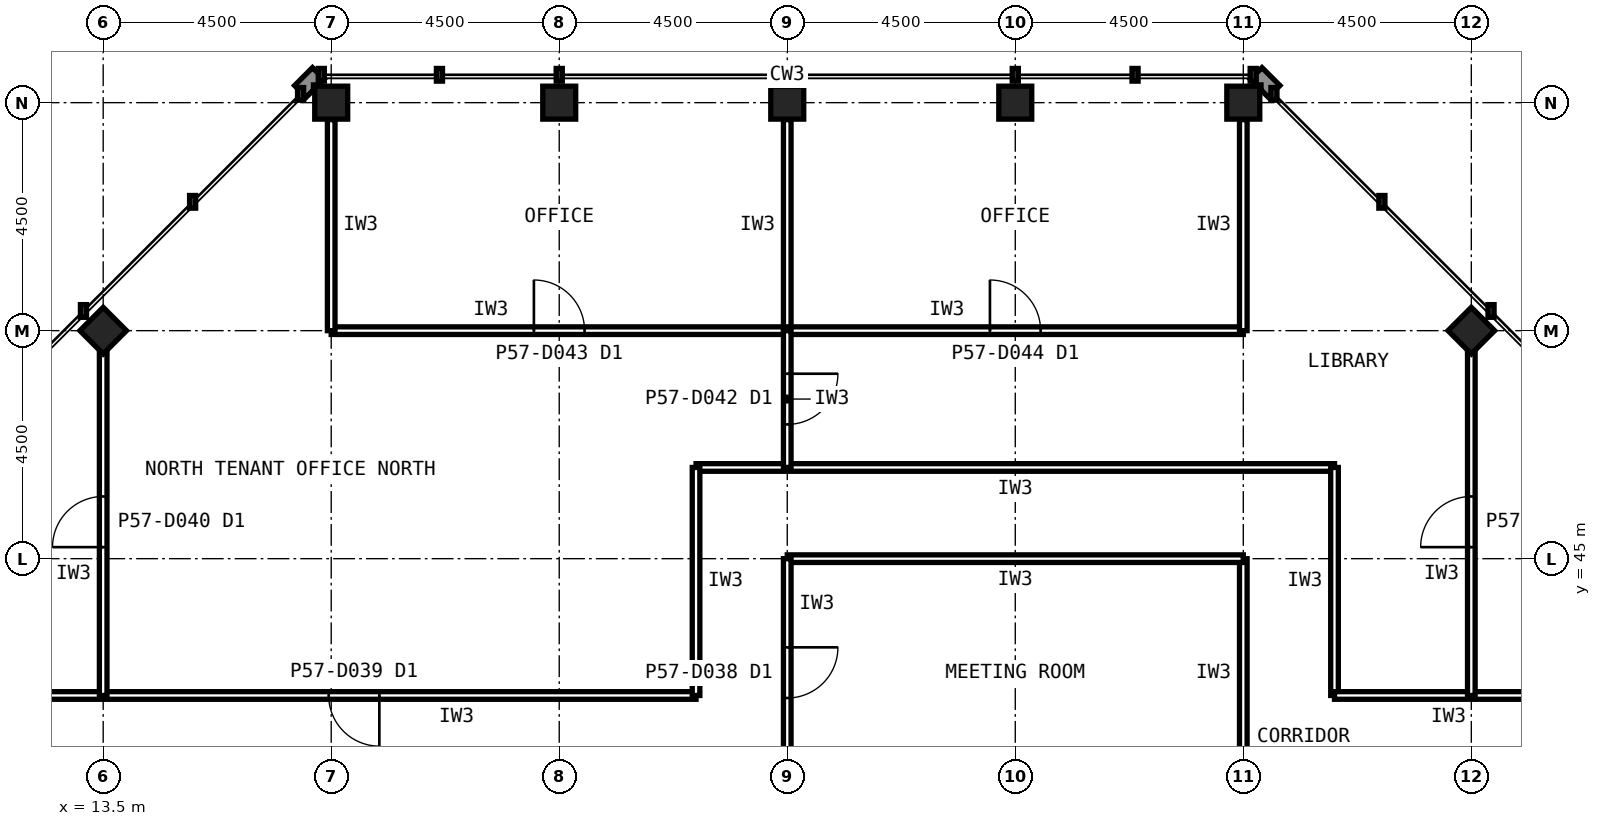
"""IFC4 building model, lengths in metres.
Left out: names, types, materials, properties, quantities, classifications, styles, units other than length and angle.
Written with IfcOpenShell. Run it as: python <this file> out.ifc"""

import sys

from ifc_helpers import new_model, si_unit, direction, frame, frame_2d, origin, origin_2d, place, context, subcontext, project, spatial, rectangle, hollow_rectangle, extrude, element, fill, save


model = new_model("IFC4")
c1 = context("Model", 3, precision=1e-05, world=origin(), true_north=direction((0.0, 1.0)))
c2 = subcontext(c1, "Body", "Model", "MODEL_VIEW")
j1 = project(units=[si_unit("LENGTHUNIT", "METRE"), si_unit("PLANEANGLEUNIT", "RADIAN")], contexts=[c1])
p1 = place(None, origin())
s1 = spatial("IfcSite", under=j1, at=p1, CompositionType="ELEMENT")
p2 = place(p1, origin())
s2 = spatial("IfcBuilding", under=s1, at=p2, CompositionType="ELEMENT")
p3 = place(p2, frame((0.0, 0.0, 238.6)))
s3 = spatial("IfcBuildingStorey", under=s2, at=p3, CompositionType="ELEMENT", Elevation=238.6)
for number, where, z_axis, x_axis in (
    (1, (36.0, 54.0, 0.0), (0.0, 0.0, 1.0), (1.0, 0.0, 0.0)),
    (2, (31.5, 54.0, 0.0), (0.0, 0.0, 1.0), (1.0, 0.0, 0.0)),
    (3, (27.0, 54.0, 0.0), (0.0, 0.0, 1.0), (1.0, 0.0, 0.0)),
    (4, (22.5, 54.0, 0.0), (0.0, 0.0, 1.0), (1.0, 0.0, 0.0)),
    (5, (18.0, 54.0, 0.0), (0.0, 0.0, 1.0), (1.0, 0.0, 0.0)),
    (6, (40.5, 49.5, 0.0), (0.0, 0.0, 1.0), (0.707, 0.707, 0.0)),
    (7, (13.5, 49.5, 0.0), (0.0, 0.0, 1.0), (0.707, 0.707, 0.0)),
):
    element("IfcColumn", number, at=place(p3, frame(where, z_axis=z_axis, x_axis=x_axis)), inside=s3, PredefinedType="COLUMN", context=c2, shape_type="SweptSolid", body=[
        extrude(hollow_rectangle(XDim=0.65, YDim=0.65, WallThickness=0.032, at=origin_2d()), origin(), (0.0, 0.0, 1.0), 4.0),
    ])
p4 = place(p3, frame((25.2, 42.3, 0.0), z_axis=(0.0, 0.0, 1.0), x_axis=(-1.0, 0.0, 0.0)))
e8 = element("IfcWall", 8, at=p4, inside=s3, PredefinedType="PARTITIONING", context=c2, shape_type="SweptSolid", body=[
    extrude(rectangle(XDim=13.5, YDim=0.15, at=frame_2d((6.75, 0.0))), origin(), (0.0, 0.0, 1.0), 3.84),
])
p5 = place(p4, frame((6.25, 0.0, 0.0)))
e9 = element("IfcOpeningElement", 9, at=p5, cuts=e8, PredefinedType="OPENING", context=c2, shape_type="SweptSolid", body=[
    extrude(rectangle(XDim=1.0, YDim=2.1, at=frame_2d((0.5, 1.05))), frame((0.0, 0.085, 0.0), z_axis=(0.0, -1.0, 0.0), x_axis=(1.0, 0.0, 0.0)), (0.0, 0.0, 1.0), 0.17),
])
p6 = place(p3, frame((37.8, 46.8, 0.0), z_axis=(0.0, 0.0, 1.0), x_axis=(-1.0, 0.0, 0.0)))
e10 = element("IfcWall", 10, at=p6, inside=s3, PredefinedType="PARTITIONING", context=c2, shape_type="SweptSolid", body=[
    extrude(rectangle(XDim=12.6, YDim=0.15, at=frame_2d((6.3, 0.0))), origin(), (0.0, 0.0, 1.0), 3.84),
])
for number, where, z_axis, x_axis in (
    (11, (25.2, 46.8, 0.0), (0.0, 0.0, 1.0), (0.0, -1.0, 0.0)),
    (12, (37.8, 42.3, 0.0), (0.0, 0.0, 1.0), (0.0, 1.0, 0.0)),
    (13, (42.3, 42.3, 0.0), (0.0, 0.0, 1.0), (-1.0, 0.0, 0.0)),
):
    element("IfcWall", number, at=place(p3, frame(where, z_axis=z_axis, x_axis=x_axis)), inside=s3, PredefinedType="PARTITIONING", context=c2, shape_type="SweptSolid", body=[
        extrude(rectangle(XDim=4.5, YDim=0.15, at=frame_2d((2.25, 0.0))), origin(), (0.0, 0.0, 1.0), 3.84),
    ])
p7 = place(p3, frame((36.0, 40.5, 0.0), z_axis=(0.0, 0.0, 1.0), x_axis=(0.0, 1.0, 0.0)))
e14 = element("IfcWall", 14, at=p7, inside=s3, PredefinedType="PARTITIONING", context=c2, shape_type="SweptSolid", body=[
    extrude(rectangle(XDim=4.5, YDim=0.15, at=frame_2d((2.25, 0.0))), origin(), (0.0, 0.0, 1.0), 2.989),
])
p8 = place(p3, frame((36.0, 45.0, 0.0), z_axis=(0.0, 0.0, 1.0), x_axis=(-1.0, 0.0, 0.0)))
e15 = element("IfcWall", 15, at=p8, inside=s3, PredefinedType="PARTITIONING", context=c2, shape_type="SweptSolid", body=[
    extrude(rectangle(XDim=9.0, YDim=0.15, at=frame_2d((4.5, 0.0))), origin(), (0.0, 0.0, 1.0), 3.84),
])
p9 = place(p3, frame((27.0, 45.0, 0.0), z_axis=(0.0, 0.0, 1.0), x_axis=(0.0, -1.0, 0.0)))
e16 = element("IfcWall", 16, at=p9, inside=s3, PredefinedType="PARTITIONING", context=c2, shape_type="SweptSolid", body=[
    extrude(rectangle(XDim=4.5, YDim=0.15, at=frame_2d((2.25, 0.0))), origin(), (0.0, 0.0, 1.0), 2.989),
])
p10 = place(p9, frame((1.75, 0.0, 0.0)))
e17 = element("IfcOpeningElement", 17, at=p10, cuts=e16, PredefinedType="OPENING", context=c2, shape_type="SweptSolid", body=[
    extrude(rectangle(XDim=1.0, YDim=2.1, at=frame_2d((0.5, 1.05))), frame((0.0, 0.085, 0.0), z_axis=(0.0, -1.0, 0.0), x_axis=(1.0, 0.0, 0.0)), (0.0, 0.0, 1.0), 0.17),
])
p11 = place(p3, frame((18.0, 49.5, 0.0), z_axis=(0.0, 0.0, 1.0), x_axis=(1.0, 0.0, 0.0)))
e18 = element("IfcWall", 18, at=p11, inside=s3, PredefinedType="PARTITIONING", context=c2, shape_type="SweptSolid", body=[
    extrude(rectangle(XDim=9.0, YDim=0.15, at=frame_2d((4.5, 0.0))), origin(), (0.0, 0.0, 1.0), 3.84),
])
p12 = place(p11, frame((4.0, 0.0, 0.0)))
e19 = element("IfcOpeningElement", 19, at=p12, cuts=e18, PredefinedType="OPENING", context=c2, shape_type="SweptSolid", body=[
    extrude(rectangle(XDim=1.0, YDim=2.1, at=frame_2d((0.5, 1.05))), frame((0.0, 0.085, 0.0), z_axis=(0.0, -1.0, 0.0), x_axis=(1.0, 0.0, 0.0)), (0.0, 0.0, 1.0), 0.17),
])
for number, where, z_axis, x_axis in (
    (20, (27.0, 49.5, 0.0), (0.0, 0.0, 1.0), (0.0, 1.0, 0.0)),
    (21, (18.0, 53.665, 0.0), (0.0, 0.0, 1.0), (0.0, -1.0, 0.0)),
):
    element("IfcWall", number, at=place(p3, frame(where, z_axis=z_axis, x_axis=x_axis)), inside=s3, PredefinedType="PARTITIONING", context=c2, shape_type="SweptSolid", body=[
        extrude(rectangle(XDim=4.165, YDim=0.15, at=frame_2d((2.083, 0.0))), origin(), (0.0, 0.0, 1.0), 2.989),
    ])
p13 = place(p3, frame((27.0, 49.5, 0.0), z_axis=(0.0, 0.0, 1.0), x_axis=(1.0, 0.0, 0.0)))
e22 = element("IfcWall", 22, at=p13, inside=s3, PredefinedType="PARTITIONING", context=c2, shape_type="SweptSolid", body=[
    extrude(rectangle(XDim=9.0, YDim=0.15, at=frame_2d((4.5, 0.0))), origin(), (0.0, 0.0, 1.0), 3.84),
])
p14 = place(p13, frame((4.0, 0.0, 0.0)))
e23 = element("IfcOpeningElement", 23, at=p14, cuts=e22, PredefinedType="OPENING", context=c2, shape_type="SweptSolid", body=[
    extrude(rectangle(XDim=1.0, YDim=2.1, at=frame_2d((0.5, 1.05))), frame((0.0, 0.085, 0.0), z_axis=(0.0, -1.0, 0.0), x_axis=(1.0, 0.0, 0.0)), (0.0, 0.0, 1.0), 0.17),
])
p15 = place(p3, frame((36.0, 49.5, 0.0), z_axis=(0.0, 0.0, 1.0), x_axis=(0.0, 1.0, 0.0)))
e24 = element("IfcWall", 24, at=p15, inside=s3, PredefinedType="PARTITIONING", context=c2, shape_type="SweptSolid", body=[
    extrude(rectangle(XDim=4.165, YDim=0.15, at=frame_2d((2.083, 0.0))), origin(), (0.0, 0.0, 1.0), 2.989),
])
p16 = place(p3, frame((13.5, 42.3, 0.0), z_axis=(0.0, 0.0, 1.0), x_axis=(0.0, 1.0, 0.0)))
e25 = element("IfcWall", 25, at=p16, inside=s3, PredefinedType="PARTITIONING", context=c2, shape_type="SweptSolid", body=[
    extrude(rectangle(XDim=6.855, YDim=0.15, at=frame_2d((3.427, 0.0))), origin(), (0.0, 0.0, 1.0), 2.989),
])
p17 = place(p16, frame((2.927, 0.0, 0.0)))
e26 = element("IfcOpeningElement", 26, at=p17, cuts=e25, PredefinedType="OPENING", context=c2, shape_type="SweptSolid", body=[
    extrude(rectangle(XDim=1.0, YDim=2.1, at=frame_2d((0.5, 1.05))), frame((0.0, 0.085, 0.0), z_axis=(0.0, -1.0, 0.0), x_axis=(1.0, 0.0, 0.0)), (0.0, 0.0, 1.0), 0.17),
])
p18 = place(p3, frame((27.0, 49.5, 0.0), z_axis=(0.0, 0.0, 1.0), x_axis=(0.0, -1.0, 0.0)))
e27 = element("IfcWall", 27, at=p18, inside=s3, PredefinedType="PARTITIONING", context=c2, shape_type="SweptSolid", body=[
    extrude(rectangle(XDim=2.7, YDim=0.15, at=frame_2d((1.35, 0.0))), origin(), (0.0, 0.0, 1.0), 2.989),
])
p19 = place(p18, frame((0.85, 0.0, 0.0)))
e28 = element("IfcOpeningElement", 28, at=p19, cuts=e27, PredefinedType="OPENING", context=c2, shape_type="SweptSolid", body=[
    extrude(rectangle(XDim=1.0, YDim=2.1, at=frame_2d((0.5, 1.05))), frame((0.0, 0.085, 0.0), z_axis=(0.0, -1.0, 0.0), x_axis=(1.0, 0.0, 0.0)), (0.0, 0.0, 1.0), 0.17),
])
p20 = place(p3, frame((40.5, 42.3, 0.0), z_axis=(0.0, 0.0, 1.0), x_axis=(0.0, 1.0, 0.0)))
e29 = element("IfcWall", 29, at=p20, inside=s3, PredefinedType="PARTITIONING", context=c2, shape_type="SweptSolid", body=[
    extrude(rectangle(XDim=6.855, YDim=0.15, at=frame_2d((3.427, 0.0))), origin(), (0.0, 0.0, 1.0), 2.989),
])
p21 = place(p20, frame((2.927, 0.0, 0.0)))
e30 = element("IfcOpeningElement", 30, at=p21, cuts=e29, PredefinedType="OPENING", context=c2, shape_type="SweptSolid", body=[
    extrude(rectangle(XDim=1.0, YDim=2.1, at=frame_2d((0.5, 1.05))), frame((0.0, 0.085, 0.0), z_axis=(0.0, -1.0, 0.0), x_axis=(1.0, 0.0, 0.0)), (0.0, 0.0, 1.0), 0.17),
])
p22 = place(p5, origin())
e31 = element("IfcDoor", 31, at=p22, inside=s3, OperationType="SINGLE_SWING_LEFT", PredefinedType="DOOR", context=c2, shape_type="SweptSolid", body=[
    extrude(rectangle(XDim=1.0, YDim=2.1, at=frame_2d((0.5, 1.05))), frame((0.0, 0.025, 0.0), z_axis=(0.0, -1.0, 0.0), x_axis=(1.0, 0.0, 0.0)), (0.0, 0.0, 1.0), 0.05),
])
fill(e9, e31)
p23 = place(p10, origin())
e32 = element("IfcDoor", 32, at=p23, inside=s3, OperationType="SINGLE_SWING_LEFT", PredefinedType="DOOR", context=c2, shape_type="SweptSolid", body=[
    extrude(rectangle(XDim=1.0, YDim=2.1, at=frame_2d((0.5, 1.05))), frame((0.0, 0.025, 0.0), z_axis=(0.0, -1.0, 0.0), x_axis=(1.0, 0.0, 0.0)), (0.0, 0.0, 1.0), 0.05),
])
fill(e17, e32)
p24 = place(p12, origin())
e33 = element("IfcDoor", 33, at=p24, inside=s3, OperationType="SINGLE_SWING_LEFT", PredefinedType="DOOR", context=c2, shape_type="SweptSolid", body=[
    extrude(rectangle(XDim=1.0, YDim=2.1, at=frame_2d((0.5, 1.05))), frame((0.0, 0.025, 0.0), z_axis=(0.0, -1.0, 0.0), x_axis=(1.0, 0.0, 0.0)), (0.0, 0.0, 1.0), 0.05),
])
fill(e19, e33)
p25 = place(p14, origin())
e34 = element("IfcDoor", 34, at=p25, inside=s3, OperationType="SINGLE_SWING_LEFT", PredefinedType="DOOR", context=c2, shape_type="SweptSolid", body=[
    extrude(rectangle(XDim=1.0, YDim=2.1, at=frame_2d((0.5, 1.05))), frame((0.0, 0.025, 0.0), z_axis=(0.0, -1.0, 0.0), x_axis=(1.0, 0.0, 0.0)), (0.0, 0.0, 1.0), 0.05),
])
fill(e23, e34)
p26 = place(p17, origin())
e35 = element("IfcDoor", 35, at=p26, inside=s3, OperationType="SINGLE_SWING_LEFT", PredefinedType="DOOR", context=c2, shape_type="SweptSolid", body=[
    extrude(rectangle(XDim=1.0, YDim=2.1, at=frame_2d((0.5, 1.05))), frame((0.0, 0.025, 0.0), z_axis=(0.0, -1.0, 0.0), x_axis=(1.0, 0.0, 0.0)), (0.0, 0.0, 1.0), 0.05),
])
fill(e26, e35)
p27 = place(p19, origin())
e36 = element("IfcDoor", 36, at=p27, inside=s3, OperationType="SINGLE_SWING_LEFT", PredefinedType="DOOR", context=c2, shape_type="SweptSolid", body=[
    extrude(rectangle(XDim=1.0, YDim=2.1, at=frame_2d((0.5, 1.05))), frame((0.0, 0.025, 0.0), z_axis=(0.0, -1.0, 0.0), x_axis=(1.0, 0.0, 0.0)), (0.0, 0.0, 1.0), 0.05),
])
fill(e28, e36)
p28 = place(p21, origin())
e37 = element("IfcDoor", 37, at=p28, inside=s3, OperationType="SINGLE_SWING_LEFT", PredefinedType="DOOR", context=c2, shape_type="SweptSolid", body=[
    extrude(rectangle(XDim=1.0, YDim=2.1, at=frame_2d((0.5, 1.05))), frame((0.0, 0.025, 0.0), z_axis=(0.0, -1.0, 0.0), x_axis=(1.0, 0.0, 0.0)), (0.0, 0.0, 1.0), 0.05),
])
fill(e30, e37)
save(model, sys.argv[1])
